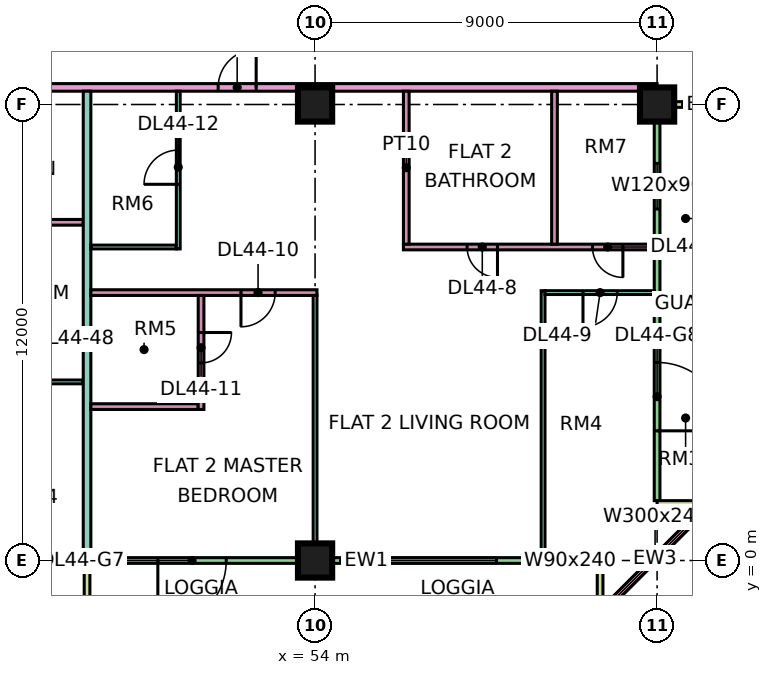
"""IFC4 building model, lengths in metres.
Left out: names, types, materials, properties, quantities, classifications, styles, units other than length and angle.
Written with IfcOpenShell. Run it as: python <this file> out.ifc"""

import sys

from ifc_helpers import new_model, si_unit, direction, frame, frame_2d, origin, origin_2d, place, context, subcontext, project, spatial, rectangle, extrude, element, fill, save


model = new_model("IFC4")
c1 = context("Model", 3, precision=1e-05, world=origin(), true_north=direction((0.0, 1.0)))
c2 = subcontext(c1, "Body", "Model", "MODEL_VIEW")
j1 = project(units=[si_unit("LENGTHUNIT", "METRE"), si_unit("PLANEANGLEUNIT", "RADIAN")], contexts=[c1])
p1 = place(None, origin())
s1 = spatial("IfcSite", under=j1, at=p1, CompositionType="ELEMENT")
p2 = place(p1, origin())
s2 = spatial("IfcBuilding", under=s1, at=p2, CompositionType="ELEMENT")
p3 = place(p2, frame((0.0, 0.0, 191.15)))
s3 = spatial("IfcBuildingStorey", under=s2, at=p3, CompositionType="ELEMENT", Elevation=191.15)
for number, where, z_axis, x_axis in (
    (1, (54.0, 0.0, 0.0), (0.0, 0.0, 1.0), (1.0, 0.0, 0.0)),
    (2, (54.0, 12.0, 0.0), (0.0, 0.0, 1.0), (1.0, 0.0, 0.0)),
    (3, (63.0, 12.0, 0.0), (0.0, 0.0, 1.0), (1.0, 0.0, 0.0)),
):
    element("IfcColumn", number, at=place(p3, frame(where, z_axis=z_axis, x_axis=x_axis)), inside=s3, PredefinedType="COLUMN", context=c2, shape_type="SweptSolid", body=[
        extrude(rectangle(XDim=0.9, YDim=0.9, at=origin_2d()), origin(), (0.0, 0.0, 1.0), 3.75),
    ])
p4 = place(p3, frame((48.075, 0.0, 0.0), z_axis=(0.0, 0.0, 1.0), x_axis=(1.0, 0.0, 0.0)))
e4 = element("IfcWall", 4, at=p4, inside=s3, PredefinedType="SOLIDWALL", context=c2, shape_type="SweptSolid", body=[
    extrude(rectangle(XDim=13.35, YDim=0.15, at=frame_2d((6.675, 0.0))), origin(), (0.0, 0.0, 1.0), 3.35),
])
p5 = place(p4, frame((1.788, 0.0, 0.0)))
e5 = element("IfcOpeningElement", 5, at=p5, cuts=e4, PredefinedType="OPENING", context=c2, shape_type="SweptSolid", body=[
    extrude(rectangle(XDim=1.8, YDim=2.4, at=frame_2d((0.9, 1.2))), frame((0.0, 0.085, 0.0), z_axis=(0.0, -1.0, 0.0), x_axis=(1.0, 0.0, 0.0)), (0.0, 0.0, 1.0), 0.17),
])
p6 = place(p4, frame((7.7, 0.0, 0.45)))
e6 = element("IfcOpeningElement", 6, at=p6, cuts=e4, PredefinedType="OPENING", context=c2, shape_type="SweptSolid", body=[
    extrude(rectangle(XDim=3.0, YDim=2.4, at=frame_2d((1.5, 1.2))), frame((0.0, 0.085, 0.0), z_axis=(0.0, -1.0, 0.0), x_axis=(1.0, 0.0, 0.0)), (0.0, 0.0, 1.0), 0.17),
])
p7 = place(p4, frame((12.188, 0.0, 0.45)))
e7 = element("IfcOpeningElement", 7, at=p7, cuts=e4, PredefinedType="OPENING", context=c2, shape_type="SweptSolid", body=[
    extrude(rectangle(XDim=0.9, YDim=2.4, at=frame_2d((0.45, 1.2))), frame((0.0, 0.085, 0.0), z_axis=(0.0, -1.0, 0.0), x_axis=(1.0, 0.0, 0.0)), (0.0, 0.0, 1.0), 0.17),
])
for number, where, z_axis, x_axis in (
    (8, (48.0, -1.5, 0.0), (0.0, 0.0, 1.0), (0.0, 1.0, 0.0)),
    (9, (61.5, -1.5, 0.0), (0.0, 0.0, 1.0), (0.0, 1.0, 0.0)),
):
    element("IfcWall", number, at=place(p3, frame(where, z_axis=z_axis, x_axis=x_axis)), inside=s3, PredefinedType="SOLIDWALL", context=c2, shape_type="SweptSolid", body=[
        extrude(rectangle(XDim=1.5, YDim=0.15, at=frame_2d((0.75, 0.0))), origin(), (0.0, 0.0, 1.0), 3.35),
    ])
p8 = place(p3, frame((61.447, -1.447, 0.0), z_axis=(0.0, 0.0, 1.0), x_axis=(0.707106781187, 0.707106781187, 0.0)))
e10 = element("IfcWall", 10, at=p8, inside=s3, PredefinedType="SOLIDWALL", context=c2, shape_type="SweptSolid", body=[
    extrude(rectangle(XDim=4.243, YDim=0.15, at=frame_2d((2.121, 0.0))), origin(), (0.0, 0.0, 1.0), 3.35),
])
p9 = place(p8, frame((0.621, 0.0, 0.45)))
e11 = element("IfcOpeningElement", 11, at=p9, cuts=e10, PredefinedType="OPENING", context=c2, shape_type="SweptSolid", body=[
    extrude(rectangle(XDim=3.0, YDim=2.4, at=frame_2d((1.5, 1.2))), frame((0.0, 0.085, 0.0), z_axis=(0.0, -1.0, 0.0), x_axis=(1.0, 0.0, 0.0)), (0.0, 0.0, 1.0), 0.17),
])
p10 = place(p3, frame((63.0, 1.575, 0.0), z_axis=(0.0, 0.0, 1.0), x_axis=(0.0, 1.0, 0.0)))
e12 = element("IfcWall", 12, at=p10, inside=s3, PredefinedType="SOLIDWALL", context=c2, shape_type="SweptSolid", body=[
    extrude(rectangle(XDim=10.35, YDim=0.15, at=frame_2d((5.175, 0.0))), origin(), (0.0, 0.0, 1.0), 3.35),
])
p11 = place(p10, frame((1.837, 0.0, 0.0)))
e13 = element("IfcOpeningElement", 13, at=p11, cuts=e12, PredefinedType="OPENING", context=c2, shape_type="SweptSolid", body=[
    extrude(rectangle(XDim=1.8, YDim=2.4, at=frame_2d((0.9, 1.2))), frame((0.0, 0.085, 0.0), z_axis=(0.0, -1.0, 0.0), x_axis=(1.0, 0.0, 0.0)), (0.0, 0.0, 1.0), 0.17),
])
p12 = place(p10, frame((7.675, 0.0, 1.7)))
e14 = element("IfcOpeningElement", 14, at=p12, cuts=e12, PredefinedType="OPENING", context=c2, shape_type="SweptSolid", body=[
    extrude(rectangle(XDim=1.2, YDim=0.9, at=frame_2d((0.6, 0.45))), frame((0.0, 0.085, 0.0), z_axis=(0.0, -1.0, 0.0), x_axis=(1.0, 0.0, 0.0)), (0.0, 0.0, 1.0), 0.17),
])
for number, where, z_axis, x_axis in (
    (15, (64.5, 1.5, 0.0), (0.0, 0.0, 1.0), (-1.0, 0.0, 0.0)),
    (16, (64.5, 12.0, 0.0), (0.0, 0.0, 1.0), (-1.0, 0.0, 0.0)),
):
    element("IfcWall", number, at=place(p3, frame(where, z_axis=z_axis, x_axis=x_axis)), inside=s3, PredefinedType="SOLIDWALL", context=c2, shape_type="SweptSolid", body=[
        extrude(rectangle(XDim=1.5, YDim=0.15, at=frame_2d((0.75, 0.0))), origin(), (0.0, 0.0, 1.0), 3.35),
    ])
p13 = place(p3, frame((33.05, 4.7, 0.0), z_axis=(0.0, 0.0, 1.0), x_axis=(1.0, 0.0, 0.0)))
e17 = element("IfcWall", 17, at=p13, inside=s3, PredefinedType="PARTITIONING", context=c2, shape_type="SweptSolid", body=[
    extrude(rectangle(XDim=14.85, YDim=0.1, at=frame_2d((7.425, 0.0))), origin(), (0.0, 0.0, 1.0), 3.35),
])
p14 = place(p13, frame((10.0, 0.0, 0.0)))
e18 = element("IfcOpeningElement", 18, at=p14, cuts=e17, PredefinedType="OPENING", context=c2, shape_type="SweptSolid", body=[
    extrude(rectangle(XDim=0.9, YDim=2.1, at=frame_2d((0.45, 1.05))), frame((0.0, 0.06, 0.0), z_axis=(0.0, -1.0, 0.0), x_axis=(1.0, 0.0, 0.0)), (0.0, 0.0, 1.0), 0.12),
])
p15 = place(p13, frame((13.0, 0.0, 0.0)))
e19 = element("IfcOpeningElement", 19, at=p15, cuts=e17, PredefinedType="OPENING", context=c2, shape_type="SweptSolid", body=[
    extrude(rectangle(XDim=0.9, YDim=2.1, at=frame_2d((0.45, 1.05))), frame((0.0, 0.06, 0.0), z_axis=(0.0, -1.0, 0.0), x_axis=(1.0, 0.0, 0.0)), (0.0, 0.0, 1.0), 0.12),
])
p16 = place(p13, frame((4.0, 0.0, 0.0)))
e20 = element("IfcOpeningElement", 20, at=p16, cuts=e17, PredefinedType="OPENING", context=c2, shape_type="SweptSolid", body=[
    extrude(rectangle(XDim=0.9, YDim=2.1, at=frame_2d((0.45, 1.05))), frame((0.0, 0.06, 0.0), z_axis=(0.0, -1.0, 0.0), x_axis=(1.0, 0.0, 0.0)), (0.0, 0.0, 1.0), 0.12),
])
p17 = place(p3, frame((40.65, 12.45, 0.0), z_axis=(0.0, 0.0, 1.0), x_axis=(1.0, 0.0, 0.0)))
e21 = element("IfcWall", 21, at=p17, inside=s3, PredefinedType="PARTITIONING", context=c2, shape_type="SweptSolid", body=[
    extrude(rectangle(XDim=22.35, YDim=0.2, at=frame_2d((11.175, 0.0))), origin(), (0.0, 0.0, 1.0), 3.35),
])
p18 = place(p17, frame((10.8, 0.0, 0.0)))
e22 = element("IfcOpeningElement", 22, at=p18, cuts=e21, PredefinedType="OPENING", context=c2, shape_type="SweptSolid", body=[
    extrude(rectangle(XDim=1.0, YDim=2.1, at=frame_2d((0.5, 1.05))), frame((0.0, 0.11, 0.0), z_axis=(0.0, -1.0, 0.0), x_axis=(1.0, 0.0, 0.0)), (0.0, 0.0, 1.0), 0.22),
])
p19 = place(p17, frame((1.05, 0.0, 0.0)))
e23 = element("IfcOpeningElement", 23, at=p19, cuts=e21, PredefinedType="OPENING", context=c2, shape_type="SweptSolid", body=[
    extrude(rectangle(XDim=1.0, YDim=2.1, at=frame_2d((0.5, 1.05))), frame((0.0, 0.11, 0.0), z_axis=(0.0, -1.0, 0.0), x_axis=(1.0, 0.0, 0.0)), (0.0, 0.0, 1.0), 0.22),
])
p20 = place(p3, frame((43.725, 5.9, 0.0), z_axis=(0.0, 0.0, 1.0), x_axis=(1.0, 0.0, 0.0)))
e24 = element("IfcWall", 24, at=p20, inside=s3, PredefinedType="PARTITIONING", context=c2, shape_type="SweptSolid", body=[
    extrude(rectangle(XDim=4.175, YDim=0.15, at=frame_2d((2.087, 0.0))), origin(), (0.0, 0.0, 1.0), 3.35),
])
p21 = place(p20, frame((1.675, 0.0, 0.0)))
e25 = element("IfcOpeningElement", 25, at=p21, cuts=e24, PredefinedType="OPENING", context=c2, shape_type="SweptSolid", body=[
    extrude(rectangle(XDim=0.8, YDim=2.1, at=frame_2d((0.4, 1.05))), frame((0.0, 0.085, 0.0), z_axis=(0.0, -1.0, 0.0), x_axis=(1.0, 0.0, 0.0)), (0.0, 0.0, 1.0), 0.17),
])
p22 = place(p3, frame((43.725, 8.9, 0.0), z_axis=(0.0, 0.0, 1.0), x_axis=(1.0, 0.0, 0.0)))
e26 = element("IfcWall", 26, at=p22, inside=s3, PredefinedType="PARTITIONING", context=c2, shape_type="SweptSolid", body=[
    extrude(rectangle(XDim=4.175, YDim=0.15, at=frame_2d((2.087, 0.0))), origin(), (0.0, 0.0, 1.0), 3.35),
])
p23 = place(p3, frame((48.0, 0.0, 0.0), z_axis=(0.0, 0.0, 1.0), x_axis=(0.0, 1.0, 0.0)))
e27 = element("IfcWall", 27, at=p23, inside=s3, PredefinedType="PARTITIONING", context=c2, shape_type="SweptSolid", body=[
    extrude(rectangle(XDim=12.35, YDim=0.2, at=frame_2d((6.175, 0.0))), origin(), (0.0, 0.0, 1.0), 3.35),
])
p24 = place(p3, frame((48.1, 4.05, 0.0), z_axis=(0.0, 0.0, 1.0), x_axis=(1.0, 0.0, 0.0)))
e28 = element("IfcWall", 28, at=p24, inside=s3, PredefinedType="PARTITIONING", context=c2, shape_type="SweptSolid", body=[
    extrude(rectangle(XDim=2.825, YDim=0.15, at=frame_2d((1.413, 0.0))), origin(), (0.0, 0.0, 1.0), 3.35),
])
p25 = place(p3, frame((48.1, 7.05, 0.0), z_axis=(0.0, 0.0, 1.0), x_axis=(1.0, 0.0, 0.0)))
e29 = element("IfcWall", 29, at=p25, inside=s3, PredefinedType="PARTITIONING", context=c2, shape_type="SweptSolid", body=[
    extrude(rectangle(XDim=5.95, YDim=0.15, at=frame_2d((2.975, 0.0))), origin(), (0.0, 0.0, 1.0), 3.35),
])
p26 = place(p25, frame((3.95, 0.0, 0.0)))
e30 = element("IfcOpeningElement", 30, at=p26, cuts=e29, PredefinedType="OPENING", context=c2, shape_type="SweptSolid", body=[
    extrude(rectangle(XDim=0.9, YDim=2.1, at=frame_2d((0.45, 1.05))), frame((0.0, 0.085, 0.0), z_axis=(0.0, -1.0, 0.0), x_axis=(1.0, 0.0, 0.0)), (0.0, 0.0, 1.0), 0.17),
])
p27 = place(p3, frame((48.1, 8.25, 0.0), z_axis=(0.0, 0.0, 1.0), x_axis=(1.0, 0.0, 0.0)))
e31 = element("IfcWall", 31, at=p27, inside=s3, PredefinedType="PARTITIONING", context=c2, shape_type="SweptSolid", body=[
    extrude(rectangle(XDim=2.25, YDim=0.1, at=frame_2d((1.125, 0.0))), origin(), (0.0, 0.0, 1.0), 3.35),
])
p28 = place(p3, frame((50.4, 8.2, 0.0), z_axis=(0.0, 0.0, 1.0), x_axis=(0.0, 1.0, 0.0)))
e32 = element("IfcWall", 32, at=p28, inside=s3, PredefinedType="PARTITIONING", context=c2, shape_type="SweptSolid", body=[
    extrude(rectangle(XDim=4.15, YDim=0.1, at=frame_2d((2.075, 0.0))), origin(), (0.0, 0.0, 1.0), 3.35),
])
p29 = place(p28, frame((1.7, 0.0, 0.0)))
e33 = element("IfcOpeningElement", 33, at=p29, cuts=e32, PredefinedType="OPENING", context=c2, shape_type="SweptSolid", body=[
    extrude(rectangle(XDim=0.9, YDim=2.1, at=frame_2d((0.45, 1.05))), frame((0.0, 0.06, 0.0), z_axis=(0.0, -1.0, 0.0), x_axis=(1.0, 0.0, 0.0)), (0.0, 0.0, 1.0), 0.12),
])
p30 = place(p3, frame((51.0, 3.975, 0.0), z_axis=(0.0, 0.0, 1.0), x_axis=(0.0, 1.0, 0.0)))
e34 = element("IfcWall", 34, at=p30, inside=s3, PredefinedType="PARTITIONING", context=c2, shape_type="SweptSolid", body=[
    extrude(rectangle(XDim=3.0, YDim=0.15, at=frame_2d((1.5, 0.0))), origin(), (0.0, 0.0, 1.0), 3.35),
])
p31 = place(p30, frame((1.225, 0.0, 0.0)))
e35 = element("IfcOpeningElement", 35, at=p31, cuts=e34, PredefinedType="OPENING", context=c2, shape_type="SweptSolid", body=[
    extrude(rectangle(XDim=0.8, YDim=2.1, at=frame_2d((0.4, 1.05))), frame((0.0, 0.085, 0.0), z_axis=(0.0, -1.0, 0.0), x_axis=(1.0, 0.0, 0.0)), (0.0, 0.0, 1.0), 0.17),
])
p32 = place(p3, frame((54.0, 0.074, 0.0), z_axis=(0.0, 0.0, 1.0), x_axis=(0.0, 1.0, 0.0)))
e36 = element("IfcWall", 36, at=p32, inside=s3, PredefinedType="PARTITIONING", context=c2, shape_type="SweptSolid", body=[
    extrude(rectangle(XDim=6.901, YDim=0.1, at=frame_2d((3.451, 0.0))), origin(), (0.0, 0.0, 1.0), 3.35),
])
p33 = place(p3, frame((56.325, 8.25, 0.0), z_axis=(0.0, 0.0, 1.0), x_axis=(1.0, 0.0, 0.0)))
e37 = element("IfcWall", 37, at=p33, inside=s3, PredefinedType="PARTITIONING", context=c2, shape_type="SweptSolid", body=[
    extrude(rectangle(XDim=6.601, YDim=0.15, at=frame_2d((3.301, 0.0))), origin(), (0.0, 0.0, 1.0), 3.35),
])
p34 = place(p33, frame((1.675, 0.0, 0.0)))
e38 = element("IfcOpeningElement", 38, at=p34, cuts=e37, PredefinedType="OPENING", context=c2, shape_type="SweptSolid", body=[
    extrude(rectangle(XDim=0.8, YDim=2.1, at=frame_2d((0.4, 1.05))), frame((0.0, 0.085, 0.0), z_axis=(0.0, -1.0, 0.0), x_axis=(1.0, 0.0, 0.0)), (0.0, 0.0, 1.0), 0.17),
])
p35 = place(p33, frame((4.975, 0.0, 0.0)))
e39 = element("IfcOpeningElement", 39, at=p35, cuts=e37, PredefinedType="OPENING", context=c2, shape_type="SweptSolid", body=[
    extrude(rectangle(XDim=0.8, YDim=2.1, at=frame_2d((0.4, 1.05))), frame((0.0, 0.085, 0.0), z_axis=(0.0, -1.0, 0.0), x_axis=(1.0, 0.0, 0.0)), (0.0, 0.0, 1.0), 0.17),
])
p36 = place(p3, frame((56.4, 8.325, 0.0), z_axis=(0.0, 0.0, 1.0), x_axis=(0.0, 1.0, 0.0)))
e40 = element("IfcWall", 40, at=p36, inside=s3, PredefinedType="PARTITIONING", context=c2, shape_type="SweptSolid", body=[
    extrude(rectangle(XDim=4.025, YDim=0.15, at=frame_2d((2.013, 0.0))), origin(), (0.0, 0.0, 1.0), 3.35),
])
p37 = place(p3, frame((60.0, 0.074, 0.0), z_axis=(0.0, 0.0, 1.0), x_axis=(0.0, 1.0, 0.0)))
e41 = element("IfcWall", 41, at=p37, inside=s3, PredefinedType="PARTITIONING", context=c2, shape_type="SweptSolid", body=[
    extrude(rectangle(XDim=7.026, YDim=0.1, at=frame_2d((3.513, 0.0))), origin(), (0.0, 0.0, 1.0), 3.35),
])
p38 = place(p3, frame((60.05, 7.05, 0.0), z_axis=(0.0, 0.0, 1.0), x_axis=(1.0, 0.0, 0.0)))
e42 = element("IfcWall", 42, at=p38, inside=s3, PredefinedType="PARTITIONING", context=c2, shape_type="SweptSolid", body=[
    extrude(rectangle(XDim=2.876, YDim=0.1, at=frame_2d((1.438, 0.0))), origin(), (0.0, 0.0, 1.0), 3.35),
])
p39 = place(p38, frame((1.0, 0.0, 0.0)))
e43 = element("IfcOpeningElement", 43, at=p39, cuts=e42, PredefinedType="OPENING", context=c2, shape_type="SweptSolid", body=[
    extrude(rectangle(XDim=0.9, YDim=2.1, at=frame_2d((0.45, 1.05))), frame((0.0, 0.06, 0.0), z_axis=(0.0, -1.0, 0.0), x_axis=(1.0, 0.0, 0.0)), (0.0, 0.0, 1.0), 0.12),
])
p40 = place(p3, frame((60.3, 8.325, 0.0), z_axis=(0.0, 0.0, 1.0), x_axis=(0.0, 1.0, 0.0)))
e44 = element("IfcWall", 44, at=p40, inside=s3, PredefinedType="PARTITIONING", context=c2, shape_type="SweptSolid", body=[
    extrude(rectangle(XDim=4.025, YDim=0.15, at=frame_2d((2.013, 0.0))), origin(), (0.0, 0.0, 1.0), 3.35),
])
p41 = place(p5, frame((1.8, 0.0, 0.0), z_axis=(0.0, 0.0, 1.0), x_axis=(-1.0, 0.0, 0.0)))
e45 = element("IfcDoor", 45, at=p41, inside=s3, OperationType="DOUBLE_DOOR_SINGLE_SWING", PredefinedType="DOOR", context=c2, shape_type="SweptSolid", body=[
    extrude(rectangle(XDim=1.8, YDim=2.4, at=frame_2d((0.9, 1.2))), frame((0.0, 0.025, 0.0), z_axis=(0.0, -1.0, 0.0), x_axis=(1.0, 0.0, 0.0)), (0.0, 0.0, 1.0), 0.05),
])
fill(e5, e45)
p42 = place(p6, origin())
e46 = element("IfcWindow", 46, at=p42, inside=s3, PartitioningType="SINGLE_PANEL", PredefinedType="WINDOW", context=c2, shape_type="SweptSolid", body=[
    extrude(rectangle(XDim=3.0, YDim=2.4, at=frame_2d((1.5, 1.2))), frame((0.0, 0.03, 0.0), z_axis=(0.0, -1.0, 0.0), x_axis=(1.0, 0.0, 0.0)), (0.0, 0.0, 1.0), 0.06),
])
fill(e6, e46)
p43 = place(p7, origin())
e47 = element("IfcWindow", 47, at=p43, inside=s3, PartitioningType="SINGLE_PANEL", PredefinedType="WINDOW", context=c2, shape_type="SweptSolid", body=[
    extrude(rectangle(XDim=0.9, YDim=2.4, at=frame_2d((0.45, 1.2))), frame((0.0, 0.03, 0.0), z_axis=(0.0, -1.0, 0.0), x_axis=(1.0, 0.0, 0.0)), (0.0, 0.0, 1.0), 0.06),
])
fill(e7, e47)
p44 = place(p9, origin())
e48 = element("IfcWindow", 48, at=p44, inside=s3, PartitioningType="SINGLE_PANEL", PredefinedType="WINDOW", context=c2, shape_type="SweptSolid", body=[
    extrude(rectangle(XDim=3.0, YDim=2.4, at=frame_2d((1.5, 1.2))), frame((0.0, 0.03, 0.0), z_axis=(0.0, -1.0, 0.0), x_axis=(1.0, 0.0, 0.0)), (0.0, 0.0, 1.0), 0.06),
])
fill(e11, e48)
p45 = place(p11, frame((1.8, 0.0, 0.0), z_axis=(0.0, 0.0, 1.0), x_axis=(-1.0, 0.0, 0.0)))
e49 = element("IfcDoor", 49, at=p45, inside=s3, OperationType="DOUBLE_DOOR_SINGLE_SWING", PredefinedType="DOOR", context=c2, shape_type="SweptSolid", body=[
    extrude(rectangle(XDim=1.8, YDim=2.4, at=frame_2d((0.9, 1.2))), frame((0.0, 0.025, 0.0), z_axis=(0.0, -1.0, 0.0), x_axis=(1.0, 0.0, 0.0)), (0.0, 0.0, 1.0), 0.05),
])
fill(e13, e49)
p46 = place(p12, origin())
e50 = element("IfcWindow", 50, at=p46, inside=s3, PartitioningType="SINGLE_PANEL", PredefinedType="WINDOW", context=c2, shape_type="SweptSolid", body=[
    extrude(rectangle(XDim=1.2, YDim=0.9, at=frame_2d((0.6, 0.45))), frame((0.0, 0.03, 0.0), z_axis=(0.0, -1.0, 0.0), x_axis=(1.0, 0.0, 0.0)), (0.0, 0.0, 1.0), 0.06),
])
fill(e14, e50)
p47 = place(p34, origin())
e51 = element("IfcDoor", 51, at=p47, inside=s3, OperationType="SINGLE_SWING_RIGHT", PredefinedType="DOOR", context=c2, shape_type="SweptSolid", body=[
    extrude(rectangle(XDim=0.8, YDim=2.1, at=frame_2d((0.4, 1.05))), frame((0.0, 0.025, 0.0), z_axis=(0.0, -1.0, 0.0), x_axis=(1.0, 0.0, 0.0)), (0.0, 0.0, 1.0), 0.05),
])
fill(e38, e51)
p48 = place(p39, frame((0.9, 0.0, 0.0), z_axis=(0.0, 0.0, 1.0), x_axis=(-1.0, 0.0, 0.0)))
e52 = element("IfcDoor", 52, at=p48, inside=s3, OperationType="SINGLE_SWING_LEFT", PredefinedType="DOOR", context=c2, shape_type="SweptSolid", body=[
    extrude(rectangle(XDim=0.9, YDim=2.1, at=frame_2d((0.45, 1.05))), frame((0.0, 0.025, 0.0), z_axis=(0.0, -1.0, 0.0), x_axis=(1.0, 0.0, 0.0)), (0.0, 0.0, 1.0), 0.05),
])
fill(e43, e52)
p49 = place(p26, frame((0.9, 0.0, 0.0), z_axis=(0.0, 0.0, 1.0), x_axis=(-1.0, 0.0, 0.0)))
e53 = element("IfcDoor", 53, at=p49, inside=s3, OperationType="SINGLE_SWING_LEFT", PredefinedType="DOOR", context=c2, shape_type="SweptSolid", body=[
    extrude(rectangle(XDim=0.9, YDim=2.1, at=frame_2d((0.45, 1.05))), frame((0.0, 0.025, 0.0), z_axis=(0.0, -1.0, 0.0), x_axis=(1.0, 0.0, 0.0)), (0.0, 0.0, 1.0), 0.05),
])
fill(e30, e53)
p50 = place(p31, origin())
e54 = element("IfcDoor", 54, at=p50, inside=s3, OperationType="SINGLE_SWING_RIGHT", PredefinedType="DOOR", context=c2, shape_type="SweptSolid", body=[
    extrude(rectangle(XDim=0.8, YDim=2.1, at=frame_2d((0.4, 1.05))), frame((0.0, 0.025, 0.0), z_axis=(0.0, -1.0, 0.0), x_axis=(1.0, 0.0, 0.0)), (0.0, 0.0, 1.0), 0.05),
])
fill(e35, e54)
p51 = place(p29, origin())
e55 = element("IfcDoor", 55, at=p51, inside=s3, OperationType="SINGLE_SWING_LEFT", PredefinedType="DOOR", context=c2, shape_type="SweptSolid", body=[
    extrude(rectangle(XDim=0.9, YDim=2.1, at=frame_2d((0.45, 1.05))), frame((0.0, 0.025, 0.0), z_axis=(0.0, -1.0, 0.0), x_axis=(1.0, 0.0, 0.0)), (0.0, 0.0, 1.0), 0.05),
])
fill(e33, e55)
p52 = place(p35, origin())
e56 = element("IfcDoor", 56, at=p52, inside=s3, OperationType="SINGLE_SWING_RIGHT", PredefinedType="DOOR", context=c2, shape_type="SweptSolid", body=[
    extrude(rectangle(XDim=0.8, YDim=2.1, at=frame_2d((0.4, 1.05))), frame((0.0, 0.025, 0.0), z_axis=(0.0, -1.0, 0.0), x_axis=(1.0, 0.0, 0.0)), (0.0, 0.0, 1.0), 0.05),
])
fill(e39, e56)
p53 = place(p18, frame((1.0, 0.0, 0.0), z_axis=(0.0, 0.0, 1.0), x_axis=(-1.0, 0.0, 0.0)))
e57 = element("IfcDoor", 57, at=p53, inside=s3, OperationType="SINGLE_SWING_RIGHT", PredefinedType="DOOR", context=c2, shape_type="SweptSolid", body=[
    extrude(rectangle(XDim=1.0, YDim=2.1, at=frame_2d((0.5, 1.05))), frame((0.0, 0.025, 0.0), z_axis=(0.0, -1.0, 0.0), x_axis=(1.0, 0.0, 0.0)), (0.0, 0.0, 1.0), 0.05),
])
fill(e22, e57)
save(model, sys.argv[1])
